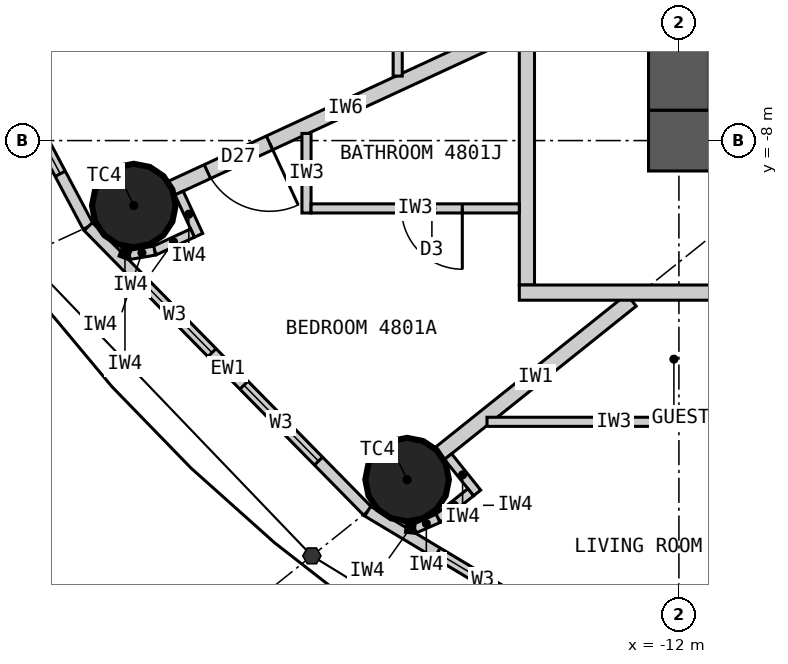
"""IFC4 building model, lengths in metres.
Left out: names, types, materials, properties, quantities, classifications, styles, units other than length and angle.
Written with IfcOpenShell. Run it as: python <this file> out.ifc"""

import sys

from ifc_helpers import new_model, si_unit, direction, frame, frame_2d, origin, origin_2d, place, context, subcontext, project, spatial, rectangle, circle, extrude, element, fill, save


model = new_model("IFC4")
c1 = context("Model", 3, precision=1e-05, world=origin(), true_north=direction((0.0, 1.0)))
c2 = subcontext(c1, "Body", "Model", "MODEL_VIEW")
j1 = project(units=[si_unit("LENGTHUNIT", "METRE"), si_unit("PLANEANGLEUNIT", "RADIAN")], contexts=[c1])
p1 = place(None, origin())
s1 = spatial("IfcSite", under=j1, at=p1, CompositionType="ELEMENT")
p2 = place(p1, origin())
s2 = spatial("IfcBuilding", under=s1, at=p2, CompositionType="ELEMENT")
p3 = place(p2, frame((0.0, 0.0, 179.7)))
s3 = spatial("IfcBuildingStorey", under=s2, at=p3, CompositionType="ELEMENT", Elevation=179.7)
for number, where, z_axis, x_axis in (
    (1, (-19.172, -8.855, 0.0), (0.0, 0.0, 1.0), (1.0, 0.0, 0.0)),
    (2, (-15.576, -12.461, 0.0), (0.0, 0.0, 1.0), (1.0, 0.0, 0.0)),
):
    element("IfcColumn", number, at=place(p3, frame(where, z_axis=z_axis, x_axis=x_axis)), inside=s3, PredefinedType="COLUMN", context=c2, shape_type="SweptSolid", body=[
        extrude(circle(Radius=0.55, at=origin_2d()), origin(), (0.0, 0.0, 1.0), 3.3),
    ])
p4 = place(p3, frame((12.4, -8.0, 0.0), z_axis=(0.0, 0.0, 1.0), x_axis=(-1.0, 0.0, 0.0)))
e3 = element("IfcWall", 3, at=p4, inside=s3, PredefinedType="SHEAR", context=c2, shape_type="SweptSolid", body=[
    extrude(rectangle(XDim=24.8, YDim=0.8, at=frame_2d((12.4, 0.0))), origin(), (0.0, 0.0, 1.0), 3.3),
])
p5 = place(p4, frame((11.1, 0.0, 0.0)))
e4 = element("IfcOpeningElement", 4, at=p5, cuts=e3, PredefinedType="OPENING", context=c2, shape_type="SweptSolid", body=[
    extrude(rectangle(XDim=1.2, YDim=2.2, at=frame_2d((0.6, 1.1))), frame((0.0, 0.41, 0.0), z_axis=(0.0, -1.0, 0.0), x_axis=(1.0, 0.0, 0.0)), (0.0, 0.0, 1.0), 0.82),
])
p6 = place(p4, frame((18.7, 0.0, 0.0)))
e5 = element("IfcOpeningElement", 5, at=p6, cuts=e3, PredefinedType="OPENING", context=c2, shape_type="SweptSolid", body=[
    extrude(rectangle(XDim=0.9, YDim=2.2, at=frame_2d((0.45, 1.1))), frame((0.0, 0.41, 0.0), z_axis=(0.0, -1.0, 0.0), x_axis=(1.0, 0.0, 0.0)), (0.0, 0.0, 1.0), 0.82),
])
p7 = place(p3, frame((-12.0, 7.6, 0.0), z_axis=(0.0, 0.0, 1.0), x_axis=(0.0, -1.0, 0.0)))
e6 = element("IfcWall", 6, at=p7, inside=s3, PredefinedType="SHEAR", context=c2, shape_type="SweptSolid", body=[
    extrude(rectangle(XDim=15.2, YDim=0.8, at=frame_2d((7.6, 0.0))), origin(), (0.0, 0.0, 1.0), 3.3),
])
p8 = place(p7, frame((6.7, 0.0, 0.0)))
e7 = element("IfcOpeningElement", 7, at=p8, cuts=e6, PredefinedType="OPENING", context=c2, shape_type="SweptSolid", body=[
    extrude(rectangle(XDim=1.8, YDim=2.2, at=frame_2d((0.9, 1.1))), frame((0.0, 0.41, 0.0), z_axis=(0.0, -1.0, 0.0), x_axis=(1.0, 0.0, 0.0)), (0.0, 0.0, 1.0), 0.82),
])
p9 = place(p3, frame((-22.102, -4.738, 0.0), z_axis=(0.0, 0.0, 1.0), x_axis=(0.468428906714, -0.883501193748, 0.0)))
e8 = element("IfcWall", 8, at=p9, inside=s3, PredefinedType="ELEMENTEDWALL", context=c2, shape_type="SweptSolid", body=[
    extrude(rectangle(XDim=4.974, YDim=0.15, at=frame_2d((2.487, 0.0))), origin(), (0.0, 0.0, 1.0), 3.12),
])
p10 = place(p9, frame((0.787, 0.0, 0.9)))
e9 = element("IfcOpeningElement", 9, at=p10, cuts=e8, PredefinedType="OPENING", context=c2, shape_type="SweptSolid", body=[
    extrude(rectangle(XDim=1.4, YDim=1.9, at=frame_2d((0.7, 0.95))), frame((0.0, 0.085, 0.0), z_axis=(0.0, -1.0, 0.0), x_axis=(1.0, 0.0, 0.0)), (0.0, 0.0, 1.0), 0.17),
])
p11 = place(p9, frame((2.787, 0.0, 0.9)))
e10 = element("IfcOpeningElement", 10, at=p11, cuts=e8, PredefinedType="OPENING", context=c2, shape_type="SweptSolid", body=[
    extrude(rectangle(XDim=1.4, YDim=1.9, at=frame_2d((0.7, 0.95))), frame((0.0, 0.085, 0.0), z_axis=(0.0, -1.0, 0.0), x_axis=(1.0, 0.0, 0.0)), (0.0, 0.0, 1.0), 0.17),
])
p12 = place(p3, frame((-19.772, -9.132, 0.0), z_axis=(0.0, 0.0, 1.0), x_axis=(0.700727467776, -0.71342905457, 0.0)))
e11 = element("IfcWall", 11, at=p12, inside=s3, PredefinedType="ELEMENTEDWALL", context=c2, shape_type="SweptSolid", body=[
    extrude(rectangle(XDim=5.247, YDim=0.15, at=frame_2d((2.624, 0.0))), origin(), (0.0, 0.0, 1.0), 3.12),
])
p13 = place(p12, frame((0.924, 0.0, 0.9)))
e12 = element("IfcOpeningElement", 12, at=p13, cuts=e11, PredefinedType="OPENING", context=c2, shape_type="SweptSolid", body=[
    extrude(rectangle(XDim=1.4, YDim=1.9, at=frame_2d((0.7, 0.95))), frame((0.0, 0.085, 0.0), z_axis=(0.0, -1.0, 0.0), x_axis=(1.0, 0.0, 0.0)), (0.0, 0.0, 1.0), 0.17),
])
p14 = place(p12, frame((2.924, 0.0, 0.9)))
e13 = element("IfcOpeningElement", 13, at=p14, cuts=e11, PredefinedType="OPENING", context=c2, shape_type="SweptSolid", body=[
    extrude(rectangle(XDim=1.4, YDim=1.9, at=frame_2d((0.7, 0.95))), frame((0.0, 0.085, 0.0), z_axis=(0.0, -1.0, 0.0), x_axis=(1.0, 0.0, 0.0)), (0.0, 0.0, 1.0), 0.17),
])
p15 = place(p3, frame((-16.095, -12.876, 0.0), z_axis=(0.0, 0.0, 1.0), x_axis=(0.857695199231, -0.514158482587, 0.0)))
e14 = element("IfcWall", 14, at=p15, inside=s3, PredefinedType="ELEMENTEDWALL", context=c2, shape_type="SweptSolid", body=[
    extrude(rectangle(XDim=5.536, YDim=0.15, at=frame_2d((2.768, 0.0))), origin(), (0.0, 0.0, 1.0), 3.12),
])
p16 = place(p15, frame((1.068, 0.0, 0.9)))
e15 = element("IfcOpeningElement", 15, at=p16, cuts=e14, PredefinedType="OPENING", context=c2, shape_type="SweptSolid", body=[
    extrude(rectangle(XDim=1.4, YDim=1.9, at=frame_2d((0.7, 0.95))), frame((0.0, 0.085, 0.0), z_axis=(0.0, -1.0, 0.0), x_axis=(1.0, 0.0, 0.0)), (0.0, 0.0, 1.0), 0.17),
])
p17 = place(p15, frame((3.068, 0.0, 0.9)))
e16 = element("IfcOpeningElement", 16, at=p17, cuts=e14, PredefinedType="OPENING", context=c2, shape_type="SweptSolid", body=[
    extrude(rectangle(XDim=1.4, YDim=1.9, at=frame_2d((0.7, 0.95))), frame((0.0, 0.085, 0.0), z_axis=(0.0, -1.0, 0.0), x_axis=(1.0, 0.0, 0.0)), (0.0, 0.0, 1.0), 0.17),
])
p18 = place(p3, frame((-14.0, 9.9, 0.0), z_axis=(0.0, 0.0, 1.0), x_axis=(0.0, -1.0, 0.0)))
e17 = element("IfcWall", 17, at=p18, inside=s3, PredefinedType="PARTITIONING", context=c2, shape_type="SweptSolid", body=[
    extrude(rectangle(XDim=19.8, YDim=0.2, at=frame_2d((9.9, 0.0))), origin(), (0.0, 0.0, 1.0), 3.12),
])
p19 = place(p18, frame((13.853, 0.0, 0.0)))
e18 = element("IfcOpeningElement", 18, at=p19, cuts=e17, PredefinedType="OPENING", context=c2, shape_type="SweptSolid", body=[
    extrude(rectangle(XDim=1.0, YDim=2.2, at=frame_2d((0.5, 1.1))), frame((0.0, 0.11, 0.0), z_axis=(0.0, -1.0, 0.0), x_axis=(1.0, 0.0, 0.0)), (0.0, 0.0, 1.0), 0.22),
])
p20 = place(p18, frame((1.1, 0.0, 0.0)))
e19 = element("IfcOpeningElement", 19, at=p20, cuts=e17, PredefinedType="OPENING", context=c2, shape_type="SweptSolid", body=[
    extrude(rectangle(XDim=1.0, YDim=2.2, at=frame_2d((0.5, 1.1))), frame((0.0, 0.11, 0.0), z_axis=(0.0, -1.0, 0.0), x_axis=(1.0, 0.0, 0.0)), (0.0, 0.0, 1.0), 0.22),
])
p21 = place(p18, frame((3.688, 0.0, 0.0)))
e20 = element("IfcOpeningElement", 20, at=p21, cuts=e17, PredefinedType="OPENING", context=c2, shape_type="SweptSolid", body=[
    extrude(rectangle(XDim=1.0, YDim=2.2, at=frame_2d((0.5, 1.1))), frame((0.0, 0.11, 0.0), z_axis=(0.0, -1.0, 0.0), x_axis=(1.0, 0.0, 0.0)), (0.0, 0.0, 1.0), 0.22),
])
p22 = place(p18, frame((8.719, 0.0, 0.0)))
e21 = element("IfcOpeningElement", 21, at=p22, cuts=e17, PredefinedType="OPENING", context=c2, shape_type="SweptSolid", body=[
    extrude(rectangle(XDim=1.0, YDim=2.2, at=frame_2d((0.5, 1.1))), frame((0.0, 0.11, 0.0), z_axis=(0.0, -1.0, 0.0), x_axis=(1.0, 0.0, 0.0)), (0.0, 0.0, 1.0), 0.22),
])
p23 = place(p3, frame((-14.1, -6.512, 0.0), z_axis=(0.0, 0.0, 1.0), x_axis=(-0.907823150669, -0.419353224751, 0.0)))
e22 = element("IfcWall", 22, at=p23, inside=s3, PredefinedType="PARTITIONING", context=c2, shape_type="SweptSolid", body=[
    extrude(rectangle(XDim=5.037, YDim=0.2, at=frame_2d((2.519, 0.0))), origin(), (0.0, 0.0, 1.0), 2.22),
])
p24 = place(p23, frame((3.62, 0.0, 0.0)))
e23 = element("IfcOpeningElement", 23, at=p24, cuts=e22, PredefinedType="OPENING", context=c2, shape_type="SweptSolid", body=[
    extrude(rectangle(XDim=0.9, YDim=2.1, at=frame_2d((0.45, 1.05))), frame((0.0, 0.11, 0.0), z_axis=(0.0, -1.0, 0.0), x_axis=(1.0, 0.0, 0.0)), (0.0, 0.0, 1.0), 0.22),
])
p25 = place(p3, frame((-12.625, -10.1, 0.0), z_axis=(0.0, 0.0, 1.0), x_axis=(-0.780876185034, -0.624685827954, 0.0)))
e24 = element("IfcWall", 24, at=p25, inside=s3, PredefinedType="PARTITIONING", context=c2, shape_type="SweptSolid", body=[
    extrude(rectangle(XDim=3.229, YDim=0.2, at=frame_2d((1.615, 0.0))), origin(), (0.0, 0.0, 1.0), 2.27),
])
p26 = place(p3, frame((-15.7, -7.152, 0.0), z_axis=(0.0, 0.0, 1.0), x_axis=(0.0, 1.0, 0.0)))
e25 = element("IfcWall", 25, at=p26, inside=s3, PredefinedType="PARTITIONING", context=c2, shape_type="SweptSolid", body=[
    extrude(rectangle(XDim=2.079, YDim=0.12, at=frame_2d((1.04, 0.0))), origin(), (0.0, 0.0, 1.0), 3.12),
])
p27 = place(p3, frame((-16.9, -7.906, 0.0), z_axis=(0.0, 0.0, 1.0), x_axis=(0.0, -1.0, 0.0)))
e26 = element("IfcWall", 26, at=p27, inside=s3, PredefinedType="PARTITIONING", context=c2, shape_type="SweptSolid", body=[
    extrude(rectangle(XDim=1.047, YDim=0.12, at=frame_2d((0.523, 0.0))), origin(), (0.0, 0.0, 1.0), 3.12),
])
p28 = place(p3, frame((-14.1, -8.893, 0.0), z_axis=(0.0, 0.0, 1.0), x_axis=(-1.0, 0.0, 0.0)))
e27 = element("IfcWall", 27, at=p28, inside=s3, PredefinedType="PARTITIONING", context=c2, shape_type="SweptSolid", body=[
    extrude(rectangle(XDim=2.74, YDim=0.12, at=frame_2d((1.37, 0.0))), origin(), (0.0, 0.0, 1.0), 3.12),
])
p29 = place(p28, frame((0.75, 0.0, 0.0)))
e28 = element("IfcOpeningElement", 28, at=p29, cuts=e27, PredefinedType="OPENING", context=c2, shape_type="SweptSolid", body=[
    extrude(rectangle(XDim=0.8, YDim=2.1, at=frame_2d((0.4, 1.05))), frame((0.0, 0.07, 0.0), z_axis=(0.0, -1.0, 0.0), x_axis=(1.0, 0.0, 0.0)), (0.0, 0.0, 1.0), 0.14),
])
p30 = place(p3, frame((-14.525, -11.7, 0.0), z_axis=(0.0, 0.0, 1.0), x_axis=(1.0, 0.0, 0.0)))
e29 = element("IfcWall", 29, at=p30, inside=s3, PredefinedType="PARTITIONING", context=c2, shape_type="SweptSolid", body=[
    extrude(rectangle(XDim=3.34, YDim=0.12, at=frame_2d((1.67, 0.0))), origin(), (0.0, 0.0, 1.0), 3.12),
])
p31 = place(p3, frame((-0.006, -10.0, 0.0), z_axis=(0.0, 0.0, 1.0), x_axis=(-1.0, 0.0, 0.0)))
e30 = element("IfcWall", 30, at=p31, inside=s3, PredefinedType="PARTITIONING", context=c2, shape_type="SweptSolid", body=[
    extrude(rectangle(XDim=14.094, YDim=0.2, at=frame_2d((7.047, 0.0))), origin(), (0.0, 0.0, 1.0), 3.12),
])
p32 = place(p31, frame((10.059, 0.0, 0.0)))
e31 = element("IfcOpeningElement", 31, at=p32, cuts=e30, PredefinedType="OPENING", context=c2, shape_type="SweptSolid", body=[
    extrude(rectangle(XDim=1.0, YDim=2.2, at=frame_2d((0.5, 1.1))), frame((0.0, 0.11, 0.0), z_axis=(0.0, -1.0, 0.0), x_axis=(1.0, 0.0, 0.0)), (0.0, 0.0, 1.0), 0.22),
])
p33 = place(p3, frame((-18.576, -8.69, 0.0), z_axis=(0.0, 0.0, 1.0), x_axis=(0.419083463716, -0.907947713494, 0.0)))
e32 = element("IfcWall", 32, at=p33, inside=s3, PredefinedType="PARTITIONING", context=c2, shape_type="SweptSolid", body=[
    extrude(rectangle(XDim=0.612, YDim=0.12, at=frame_2d((0.306, 0.0))), origin(), (0.0, 0.0, 1.0), 3.12),
])
p34 = place(p3, frame((-18.399, -9.217, 0.0), z_axis=(0.0, 0.0, 1.0), x_axis=(-0.907933393845, -0.419114485961, 0.0)))
e33 = element("IfcWall", 33, at=p34, inside=s3, PredefinedType="PARTITIONING", context=c2, shape_type="SweptSolid", body=[
    extrude(rectangle(XDim=0.55, YDim=0.12, at=frame_2d((0.275, 0.0))), origin(), (0.0, 0.0, 1.0), 3.12),
])
p35 = place(p3, frame((-18.899, -9.447, 0.0), z_axis=(0.0, 0.0, 1.0), x_axis=(-0.985338822624, -0.170608923066, 0.0)))
e34 = element("IfcWall", 34, at=p35, inside=s3, PredefinedType="PARTITIONING", context=c2, shape_type="SweptSolid", body=[
    extrude(rectangle(XDim=0.338, YDim=0.12, at=frame_2d((0.169, 0.0))), origin(), (0.0, 0.0, 1.0), 3.12),
])
p36 = place(p3, frame((-19.231, -9.505, 0.0), z_axis=(0.0, 0.0, 1.0), x_axis=(-0.938377418573, 0.345612239817, 0.0)))
e35 = element("IfcWall", 35, at=p36, inside=s3, PredefinedType="PARTITIONING", context=c2, shape_type="SweptSolid", body=[
    extrude(rectangle(XDim=0.122, YDim=0.12, at=frame_2d((0.061, 0.0))), origin(), (0.0, 0.0, 1.0), 3.12),
])
p37 = place(p3, frame((-15.037, -12.158, 0.0), z_axis=(0.0, 0.0, 1.0), x_axis=(0.624840920722, -0.78075208856, 0.0)))
e36 = element("IfcWall", 36, at=p37, inside=s3, PredefinedType="PARTITIONING", context=c2, shape_type="SweptSolid", body=[
    extrude(rectangle(XDim=0.612, YDim=0.12, at=frame_2d((0.306, 0.0))), origin(), (0.0, 0.0, 1.0), 3.12),
])
p38 = place(p3, frame((-14.739, -12.627, 0.0), z_axis=(0.0, 0.0, 1.0), x_axis=(-0.780912119987, -0.624640905527, 0.0)))
e37 = element("IfcWall", 37, at=p38, inside=s3, PredefinedType="PARTITIONING", context=c2, shape_type="SweptSolid", body=[
    extrude(rectangle(XDim=0.55, YDim=0.12, at=frame_2d((0.275, 0.0))), origin(), (0.0, 0.0, 1.0), 3.12),
])
p39 = place(p3, frame((-15.169, -12.97, 0.0), z_axis=(0.0, 0.0, 1.0), x_axis=(-0.915974725257, -0.401235968838, 0.0)))
e38 = element("IfcWall", 38, at=p39, inside=s3, PredefinedType="PARTITIONING", context=c2, shape_type="SweptSolid", body=[
    extrude(rectangle(XDim=0.338, YDim=0.12, at=frame_2d((0.169, 0.0))), origin(), (0.0, 0.0, 1.0), 3.12),
])
p40 = place(p3, frame((-15.478, -13.106, 0.0), z_axis=(0.0, 0.0, 1.0), x_axis=(-0.993778813557, 0.111371763588, 0.0)))
e39 = element("IfcWall", 39, at=p40, inside=s3, PredefinedType="PARTITIONING", context=c2, shape_type="SweptSolid", body=[
    extrude(rectangle(XDim=0.114, YDim=0.12, at=frame_2d((0.057, 0.0))), origin(), (0.0, 0.0, 1.0), 3.12),
])
p41 = place(p11, origin())
e40 = element("IfcWindow", 40, at=p41, inside=s3, PartitioningType="SINGLE_PANEL", PredefinedType="WINDOW", context=c2, shape_type="SweptSolid", body=[
    extrude(rectangle(XDim=1.4, YDim=1.9, at=frame_2d((0.7, 0.95))), frame((0.0, 0.03, 0.0), z_axis=(0.0, -1.0, 0.0), x_axis=(1.0, 0.0, 0.0)), (0.0, 0.0, 1.0), 0.06),
])
fill(e10, e40)
p42 = place(p13, origin())
e41 = element("IfcWindow", 41, at=p42, inside=s3, PartitioningType="SINGLE_PANEL", PredefinedType="WINDOW", context=c2, shape_type="SweptSolid", body=[
    extrude(rectangle(XDim=1.4, YDim=1.9, at=frame_2d((0.7, 0.95))), frame((0.0, 0.03, 0.0), z_axis=(0.0, -1.0, 0.0), x_axis=(1.0, 0.0, 0.0)), (0.0, 0.0, 1.0), 0.06),
])
fill(e12, e41)
p43 = place(p14, origin())
e42 = element("IfcWindow", 42, at=p43, inside=s3, PartitioningType="SINGLE_PANEL", PredefinedType="WINDOW", context=c2, shape_type="SweptSolid", body=[
    extrude(rectangle(XDim=1.4, YDim=1.9, at=frame_2d((0.7, 0.95))), frame((0.0, 0.03, 0.0), z_axis=(0.0, -1.0, 0.0), x_axis=(1.0, 0.0, 0.0)), (0.0, 0.0, 1.0), 0.06),
])
fill(e13, e42)
p44 = place(p16, origin())
e43 = element("IfcWindow", 43, at=p44, inside=s3, PartitioningType="SINGLE_PANEL", PredefinedType="WINDOW", context=c2, shape_type="SweptSolid", body=[
    extrude(rectangle(XDim=1.4, YDim=1.9, at=frame_2d((0.7, 0.95))), frame((0.0, 0.03, 0.0), z_axis=(0.0, -1.0, 0.0), x_axis=(1.0, 0.0, 0.0)), (0.0, 0.0, 1.0), 0.06),
])
fill(e15, e43)
p45 = place(p29, origin())
e44 = element("IfcDoor", 44, at=p45, inside=s3, OperationType="SINGLE_SWING_LEFT", PredefinedType="DOOR", context=c2, shape_type="SweptSolid", body=[
    extrude(rectangle(XDim=0.8, YDim=2.1, at=frame_2d((0.4, 1.05))), frame((0.0, 0.025, 0.0), z_axis=(0.0, -1.0, 0.0), x_axis=(1.0, 0.0, 0.0)), (0.0, 0.0, 1.0), 0.05),
])
fill(e28, e44)
p46 = place(p24, origin())
e45 = element("IfcDoor", 45, at=p46, inside=s3, OperationType="SINGLE_SWING_LEFT", PredefinedType="DOOR", context=c2, shape_type="SweptSolid", body=[
    extrude(rectangle(XDim=0.9, YDim=2.1, at=frame_2d((0.45, 1.05))), frame((0.0, 0.025, 0.0), z_axis=(0.0, -1.0, 0.0), x_axis=(1.0, 0.0, 0.0)), (0.0, 0.0, 1.0), 0.05),
])
fill(e23, e45)
save(model, sys.argv[1])
